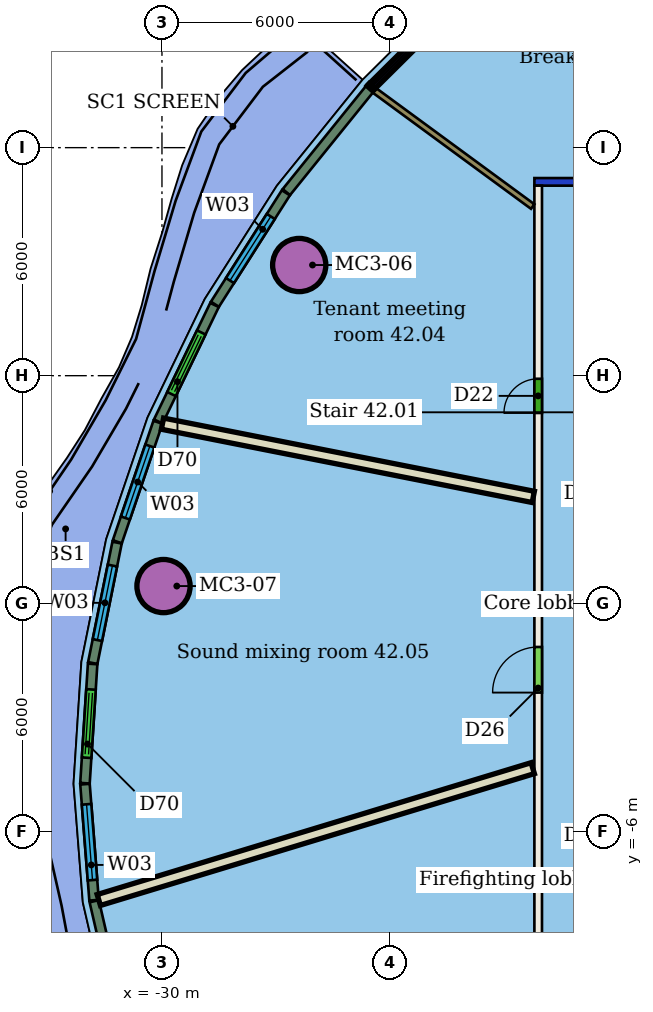
"""IFC4 building model, lengths in metres.
Left out: names, types, materials, properties, quantities, classifications, styles, units other than length and angle.
Written with IfcOpenShell. Run it as: python <this file> out.ifc"""

import sys

from ifc_helpers import new_model, si_unit, direction, frame, frame_2d, origin, origin_2d, place, context, subcontext, project, spatial, rectangle, hollow_circle, extrude, element, fill, save


model = new_model("IFC4")
c1 = context("Model", 3, precision=1e-05, world=origin(), true_north=direction((0.0, 1.0)))
c2 = subcontext(c1, "Body", "Model", "MODEL_VIEW")
j1 = project(units=[si_unit("LENGTHUNIT", "METRE"), si_unit("PLANEANGLEUNIT", "RADIAN")], contexts=[c1])
p1 = place(None, origin())
s1 = spatial("IfcSite", under=j1, at=p1, CompositionType="ELEMENT")
p2 = place(p1, origin())
s2 = spatial("IfcBuilding", under=s1, at=p2, CompositionType="ELEMENT")
p3 = place(p2, frame((0.0, 0.0, 175.8)))
s3 = spatial("IfcBuildingStorey", under=s2, at=p3, CompositionType="ELEMENT", Elevation=175.8)
for number, where, z_axis, x_axis in (
    (1, (-26.388, 8.912, 0.0), (0.0, 0.0, 1.0), (1.0, 0.0, 0.0)),
    (2, (-29.959, 0.464, 0.0), (0.0, 0.0, 1.0), (1.0, 0.0, 0.0)),
):
    element("IfcColumn", number, at=place(p3, frame(where, z_axis=z_axis, x_axis=x_axis)), inside=s3, PredefinedType="COLUMN", context=c2, shape_type="SweptSolid", body=[
        extrude(hollow_circle(Radius=0.7, WallThickness=0.05, at=origin_2d()), origin(), (0.0, 0.0, 1.0), 3.4),
    ])
p4 = place(p3, frame((-20.1, -11.0, 0.0), z_axis=(0.0, 0.0, 1.0), x_axis=(0.0, 1.0, 0.0)))
e3 = element("IfcWall", 3, at=p4, inside=s3, PredefinedType="PARTITIONING", context=c2, shape_type="SweptSolid", body=[
    extrude(rectangle(XDim=22.0, YDim=0.2, at=frame_2d((11.0, 0.0))), origin(), (0.0, 0.0, 1.0), 3.4),
])
p5 = place(p4, frame((16.019, 0.0, 0.0)))
e4 = element("IfcOpeningElement", 4, at=p5, cuts=e3, PredefinedType="OPENING", context=c2, shape_type="SweptSolid", body=[
    extrude(rectangle(XDim=0.9, YDim=2.1, at=frame_2d((0.45, 1.05))), frame((0.0, 0.11, 0.0), z_axis=(0.0, -1.0, 0.0), x_axis=(1.0, 0.0, 0.0)), (0.0, 0.0, 1.0), 0.22),
])
p6 = place(p4, frame((8.662, 0.0, 0.0)))
e5 = element("IfcOpeningElement", 5, at=p6, cuts=e3, PredefinedType="OPENING", context=c2, shape_type="SweptSolid", body=[
    extrude(rectangle(XDim=1.2, YDim=2.1, at=frame_2d((0.6, 1.05))), frame((0.0, 0.11, 0.0), z_axis=(0.0, -1.0, 0.0), x_axis=(1.0, 0.0, 0.0)), (0.0, 0.0, 1.0), 0.22),
])
p7 = place(p3, frame((-20.2, 11.1, 0.0), z_axis=(0.0, 0.0, 1.0), x_axis=(1.0, 0.0, 0.0)))
e6 = element("IfcWall", 6, at=p7, inside=s3, PredefinedType="PARTITIONING", context=c2, shape_type="SweptSolid", body=[
    extrude(rectangle(XDim=28.4, YDim=0.2, at=frame_2d((14.2, 0.0))), origin(), (0.0, 0.0, 1.0), 3.0),
])
p8 = place(p7, frame((19.265, 0.0, 0.0)))
e7 = element("IfcOpeningElement", 7, at=p8, cuts=e6, PredefinedType="OPENING", context=c2, shape_type="SweptSolid", body=[
    extrude(rectangle(XDim=1.1, YDim=2.1, at=frame_2d((0.55, 1.05))), frame((0.0, 0.11, 0.0), z_axis=(0.0, -1.0, 0.0), x_axis=(1.0, 0.0, 0.0)), (0.0, 0.0, 1.0), 0.22),
])
p9 = place(p7, frame((10.901, 0.0, 0.0)))
e8 = element("IfcOpeningElement", 8, at=p9, cuts=e6, PredefinedType="OPENING", context=c2, shape_type="SweptSolid", body=[
    extrude(rectangle(XDim=1.8, YDim=2.1, at=frame_2d((0.9, 1.05))), frame((0.0, 0.11, 0.0), z_axis=(0.0, -1.0, 0.0), x_axis=(1.0, 0.0, 0.0)), (0.0, 0.0, 1.0), 0.22),
])
p10 = place(p7, frame((4.839, 0.0, 0.0)))
e9 = element("IfcOpeningElement", 9, at=p10, cuts=e6, PredefinedType="OPENING", context=c2, shape_type="SweptSolid", body=[
    extrude(rectangle(XDim=1.5, YDim=2.1, at=frame_2d((0.75, 1.05))), frame((0.0, 0.11, 0.0), z_axis=(0.0, -1.0, 0.0), x_axis=(1.0, 0.0, 0.0)), (0.0, 0.0, 1.0), 0.22),
])
p11 = place(p7, frame((25.405, 0.0, 0.0)))
e10 = element("IfcOpeningElement", 10, at=p11, cuts=e6, PredefinedType="OPENING", context=c2, shape_type="SweptSolid", body=[
    extrude(rectangle(XDim=1.2, YDim=2.1, at=frame_2d((0.6, 1.05))), frame((0.0, 0.11, 0.0), z_axis=(0.0, -1.0, 0.0), x_axis=(1.0, 0.0, 0.0)), (0.0, 0.0, 1.0), 0.22),
])
p12 = place(p3, frame((-24.406, 13.504, 0.0), z_axis=(0.0, 0.0, 1.0), x_axis=(0.806278661404, -0.591535899303, 0.0)))
e11 = element("IfcWall", 11, at=p12, inside=s3, PredefinedType="PARTITIONING", context=c2, shape_type="SweptSolid", body=[
    extrude(rectangle(XDim=5.162, YDim=0.15, at=frame_2d((2.581, 0.0))), origin(), (0.0, 0.0, 1.0), 3.4),
])
p13 = place(p3, frame((-29.987, 4.737, 0.0), z_axis=(0.0, 0.0, 1.0), x_axis=(0.981048005171, -0.193764835689, 0.0)))
e12 = element("IfcWall", 12, at=p13, inside=s3, PredefinedType="PARTITIONING", context=c2, shape_type="SweptSolid", body=[
    extrude(rectangle(XDim=9.946, YDim=0.3, at=frame_2d((4.973, 0.0))), origin(), (0.0, 0.0, 1.0), 3.4),
])
p14 = place(p3, frame((-31.662, -7.796, 0.0), z_axis=(0.0, 0.0, 1.0), x_axis=(0.956816478415, 0.290692666976, 0.0)))
e13 = element("IfcWall", 13, at=p14, inside=s3, PredefinedType="PARTITIONING", context=c2, shape_type="SweptSolid", body=[
    extrude(rectangle(XDim=11.934, YDim=0.3, at=frame_2d((5.967, 0.0))), origin(), (0.0, 0.0, 1.0), 3.4),
])
p15 = place(p3, frame((-24.533, 13.545, 0.0), z_axis=(0.0, 0.0, 1.0), x_axis=(-0.628441308027, -0.777857006374, 0.0)))
e14 = element("IfcWall", 14, at=p15, inside=s3, PredefinedType="SOLIDWALL", context=c2, shape_type="SweptSolid", body=[
    extrude(rectangle(XDim=3.49, YDim=0.25, at=frame_2d((1.745, 0.0))), origin(), (0.0, 0.0, 1.0), 3.05),
])
p16 = place(p3, frame((-26.74, 10.812, 0.0), z_axis=(0.0, 0.0, 1.0), x_axis=(-0.53695729442, -0.843609426197, 0.0)))
e15 = element("IfcWall", 15, at=p16, inside=s3, PredefinedType="SOLIDWALL", context=c2, shape_type="SweptSolid", body=[
    extrude(rectangle(XDim=3.476, YDim=0.25, at=frame_2d((1.738, 0.0))), origin(), (0.0, 0.0, 1.0), 3.05),
])
p17 = place(p16, frame((0.738, 0.0, 0.9)))
e16 = element("IfcOpeningElement", 16, at=p17, cuts=e15, PredefinedType="OPENING", context=c2, shape_type="SweptSolid", body=[
    extrude(rectangle(XDim=2.0, YDim=2.1, at=frame_2d((1.0, 1.05))), frame((0.0, 0.135, 0.0), z_axis=(0.0, -1.0, 0.0), x_axis=(1.0, 0.0, 0.0)), (0.0, 0.0, 1.0), 0.27),
])
p18 = place(p3, frame((-28.617, 7.86, 0.0), z_axis=(0.0, 0.0, 1.0), x_axis=(-0.434919571845, -0.900469303211, 0.0)))
e17 = element("IfcWall", 17, at=p18, inside=s3, PredefinedType="SOLIDWALL", context=c2, shape_type="SweptSolid", body=[
    extrude(rectangle(XDim=3.404, YDim=0.25, at=frame_2d((1.702, 0.0))), origin(), (0.0, 0.0, 1.0), 3.05),
])
p19 = place(p18, frame((0.802, 0.0, 0.0)))
e18 = element("IfcOpeningElement", 18, at=p19, cuts=e17, PredefinedType="OPENING", context=c2, shape_type="SweptSolid", body=[
    extrude(rectangle(XDim=1.8, YDim=2.4, at=frame_2d((0.9, 1.2))), frame((0.0, 0.135, 0.0), z_axis=(0.0, -1.0, 0.0), x_axis=(1.0, 0.0, 0.0)), (0.0, 0.0, 1.0), 0.27),
])
p20 = place(p3, frame((-30.106, 4.774, 0.0), z_axis=(0.0, 0.0, 1.0), x_axis=(-0.321869774717, -0.946783950077, 0.0)))
e19 = element("IfcWall", 19, at=p20, inside=s3, PredefinedType="SOLIDWALL", context=c2, shape_type="SweptSolid", body=[
    extrude(rectangle(XDim=3.32, YDim=0.25, at=frame_2d((1.66, 0.0))), origin(), (0.0, 0.0, 1.0), 3.05),
])
p21 = place(p20, frame((0.66, 0.0, 0.9)))
e20 = element("IfcOpeningElement", 20, at=p21, cuts=e19, PredefinedType="OPENING", context=c2, shape_type="SweptSolid", body=[
    extrude(rectangle(XDim=2.0, YDim=2.1, at=frame_2d((1.0, 1.05))), frame((0.0, 0.135, 0.0), z_axis=(0.0, -1.0, 0.0), x_axis=(1.0, 0.0, 0.0)), (0.0, 0.0, 1.0), 0.27),
])
p22 = place(p3, frame((-31.181, 1.607, 0.0), z_axis=(0.0, 0.0, 1.0), x_axis=(-0.198076987467, -0.980186465442, 0.0)))
e21 = element("IfcWall", 21, at=p22, inside=s3, PredefinedType="SOLIDWALL", context=c2, shape_type="SweptSolid", body=[
    extrude(rectangle(XDim=3.232, YDim=0.25, at=frame_2d((1.616, 0.0))), origin(), (0.0, 0.0, 1.0), 3.05),
])
p23 = place(p22, frame((0.616, 0.0, 0.9)))
e22 = element("IfcOpeningElement", 22, at=p23, cuts=e21, PredefinedType="OPENING", context=c2, shape_type="SweptSolid", body=[
    extrude(rectangle(XDim=2.0, YDim=2.1, at=frame_2d((1.0, 1.05))), frame((0.0, 0.135, 0.0), z_axis=(0.0, -1.0, 0.0), x_axis=(1.0, 0.0, 0.0)), (0.0, 0.0, 1.0), 0.27),
])
p24 = place(p3, frame((-31.824, -1.585, 0.0), z_axis=(0.0, 0.0, 1.0), x_axis=(-0.064065458037, -0.997945698466, 0.0)))
e23 = element("IfcWall", 23, at=p24, inside=s3, PredefinedType="SOLIDWALL", context=c2, shape_type="SweptSolid", body=[
    extrude(rectangle(XDim=3.144, YDim=0.25, at=frame_2d((1.572, 0.0))), origin(), (0.0, 0.0, 1.0), 3.05),
])
p25 = place(p24, frame((0.672, 0.0, 0.0)))
e24 = element("IfcOpeningElement", 24, at=p25, cuts=e23, PredefinedType="OPENING", context=c2, shape_type="SweptSolid", body=[
    extrude(rectangle(XDim=1.8, YDim=2.4, at=frame_2d((0.9, 1.2))), frame((0.0, 0.135, 0.0), z_axis=(0.0, -1.0, 0.0), x_axis=(1.0, 0.0, 0.0)), (0.0, 0.0, 1.0), 0.27),
])
p26 = place(p3, frame((-32.026, -4.748, 0.0), z_axis=(0.0, 0.0, 1.0), x_axis=(0.078116681752, -0.99694422313, 0.0)))
e25 = element("IfcWall", 25, at=p26, inside=s3, PredefinedType="SOLIDWALL", context=c2, shape_type="SweptSolid", body=[
    extrude(rectangle(XDim=3.063, YDim=0.25, at=frame_2d((1.531, 0.0))), origin(), (0.0, 0.0, 1.0), 3.05),
])
p27 = place(p26, frame((0.531, 0.0, 0.9)))
e26 = element("IfcOpeningElement", 26, at=p27, cuts=e25, PredefinedType="OPENING", context=c2, shape_type="SweptSolid", body=[
    extrude(rectangle(XDim=2.0, YDim=2.1, at=frame_2d((1.0, 1.05))), frame((0.0, 0.135, 0.0), z_axis=(0.0, -1.0, 0.0), x_axis=(1.0, 0.0, 0.0)), (0.0, 0.0, 1.0), 0.27),
])
p28 = place(p3, frame((-31.782, -7.828, 0.0), z_axis=(0.0, 0.0, 1.0), x_axis=(0.22524585032, -0.974301958796, 0.0)))
e27 = element("IfcWall", 27, at=p28, inside=s3, PredefinedType="SOLIDWALL", context=c2, shape_type="SweptSolid", body=[
    extrude(rectangle(XDim=2.954, YDim=0.25, at=frame_2d((1.477, 0.0))), origin(), (0.0, 0.0, 1.0), 3.05),
])
p29 = place(p5, origin())
e28 = element("IfcDoor", 28, at=p29, inside=s3, OperationType="SINGLE_SWING_LEFT", PredefinedType="DOOR", context=c2, shape_type="SweptSolid", body=[
    extrude(rectangle(XDim=0.9, YDim=2.1, at=frame_2d((0.45, 1.05))), frame((0.0, 0.025, 0.0), z_axis=(0.0, -1.0, 0.0), x_axis=(1.0, 0.0, 0.0)), (0.0, 0.0, 1.0), 0.05),
])
fill(e4, e28)
p30 = place(p6, origin())
e29 = element("IfcDoor", 29, at=p30, inside=s3, OperationType="SINGLE_SWING_LEFT", PredefinedType="DOOR", context=c2, shape_type="SweptSolid", body=[
    extrude(rectangle(XDim=1.2, YDim=2.1, at=frame_2d((0.6, 1.05))), frame((0.0, 0.025, 0.0), z_axis=(0.0, -1.0, 0.0), x_axis=(1.0, 0.0, 0.0)), (0.0, 0.0, 1.0), 0.05),
])
fill(e5, e29)
p31 = place(p17, origin())
e30 = element("IfcWindow", 30, at=p31, inside=s3, PartitioningType="SINGLE_PANEL", PredefinedType="WINDOW", context=c2, shape_type="SweptSolid", body=[
    extrude(rectangle(XDim=2.0, YDim=2.1, at=frame_2d((1.0, 1.05))), frame((0.0, 0.03, 0.0), z_axis=(0.0, -1.0, 0.0), x_axis=(1.0, 0.0, 0.0)), (0.0, 0.0, 1.0), 0.06),
])
fill(e16, e30)
p32 = place(p19, origin())
e31 = element("IfcDoor", 31, at=p32, inside=s3, OperationType="DOUBLE_DOOR_SLIDING", PredefinedType="DOOR", context=c2, shape_type="SweptSolid", body=[
    extrude(rectangle(XDim=1.8, YDim=2.4, at=frame_2d((0.9, 1.2))), frame((0.0, 0.025, 0.0), z_axis=(0.0, -1.0, 0.0), x_axis=(1.0, 0.0, 0.0)), (0.0, 0.0, 1.0), 0.05),
])
fill(e18, e31)
p33 = place(p21, origin())
e32 = element("IfcWindow", 32, at=p33, inside=s3, PartitioningType="SINGLE_PANEL", PredefinedType="WINDOW", context=c2, shape_type="SweptSolid", body=[
    extrude(rectangle(XDim=2.0, YDim=2.1, at=frame_2d((1.0, 1.05))), frame((0.0, 0.03, 0.0), z_axis=(0.0, -1.0, 0.0), x_axis=(1.0, 0.0, 0.0)), (0.0, 0.0, 1.0), 0.06),
])
fill(e20, e32)
p34 = place(p23, origin())
e33 = element("IfcWindow", 33, at=p34, inside=s3, PartitioningType="SINGLE_PANEL", PredefinedType="WINDOW", context=c2, shape_type="SweptSolid", body=[
    extrude(rectangle(XDim=2.0, YDim=2.1, at=frame_2d((1.0, 1.05))), frame((0.0, 0.03, 0.0), z_axis=(0.0, -1.0, 0.0), x_axis=(1.0, 0.0, 0.0)), (0.0, 0.0, 1.0), 0.06),
])
fill(e22, e33)
p35 = place(p25, origin())
e34 = element("IfcDoor", 34, at=p35, inside=s3, OperationType="DOUBLE_DOOR_SLIDING", PredefinedType="DOOR", context=c2, shape_type="SweptSolid", body=[
    extrude(rectangle(XDim=1.8, YDim=2.4, at=frame_2d((0.9, 1.2))), frame((0.0, 0.025, 0.0), z_axis=(0.0, -1.0, 0.0), x_axis=(1.0, 0.0, 0.0)), (0.0, 0.0, 1.0), 0.05),
])
fill(e24, e34)
p36 = place(p27, origin())
e35 = element("IfcWindow", 35, at=p36, inside=s3, PartitioningType="SINGLE_PANEL", PredefinedType="WINDOW", context=c2, shape_type="SweptSolid", body=[
    extrude(rectangle(XDim=2.0, YDim=2.1, at=frame_2d((1.0, 1.05))), frame((0.0, 0.03, 0.0), z_axis=(0.0, -1.0, 0.0), x_axis=(1.0, 0.0, 0.0)), (0.0, 0.0, 1.0), 0.06),
])
fill(e26, e35)
save(model, sys.argv[1])
